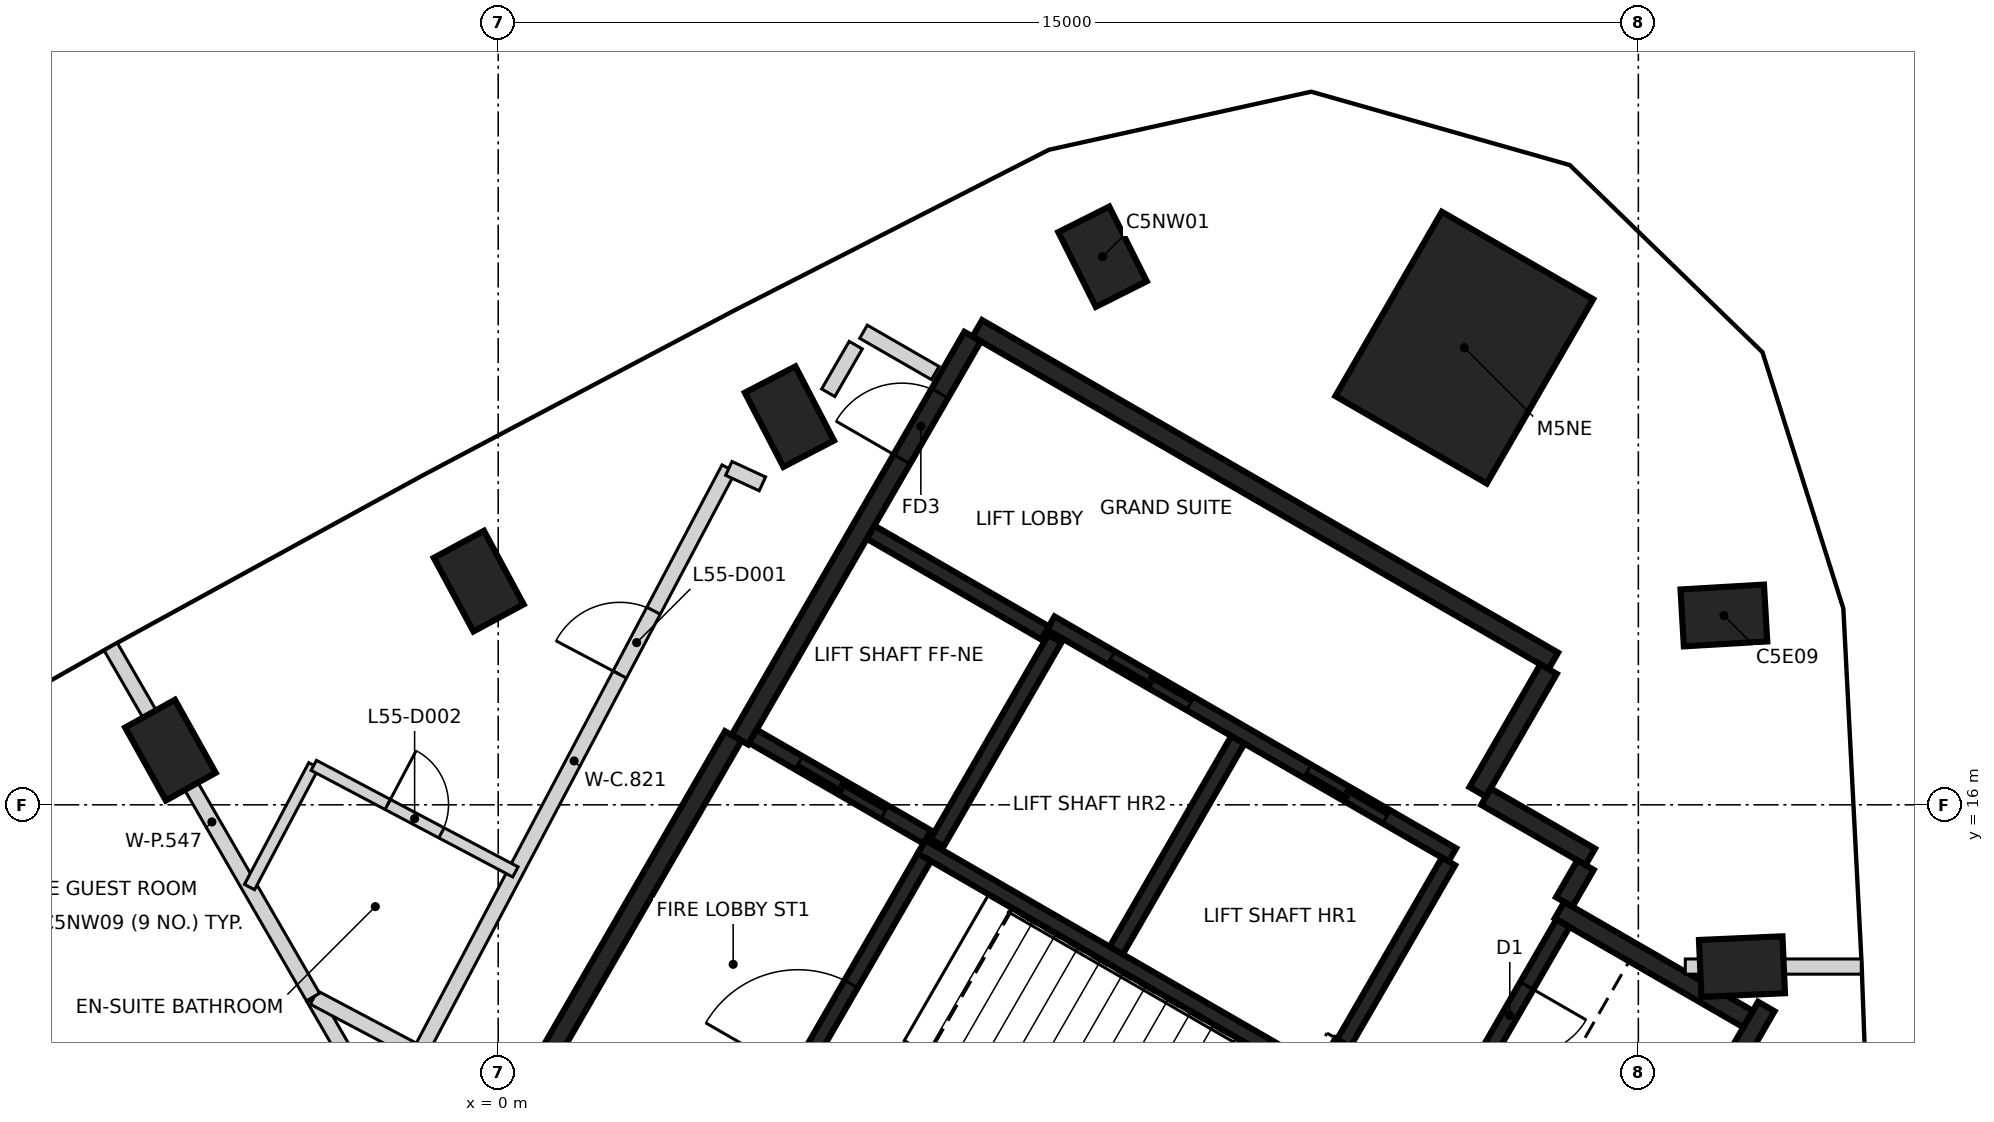
"""IFC4 building model, lengths in metres.
Left out: names, types, materials, properties, quantities, classifications, styles, units other than length and angle.
Written with IfcOpenShell. Run it as: python <this file> out.ifc"""

import sys

from ifc_helpers import new_model, si_unit, direction, frame, frame_2d, origin, origin_2d, place, context, subcontext, project, spatial, rectangle, extrude, element, fill, save


model = new_model("IFC4")
c1 = context("Model", 3, precision=1e-05, world=origin(), true_north=direction((0.0, 1.0)))
c2 = subcontext(c1, "Body", "Model", "MODEL_VIEW")
j1 = project(units=[si_unit("LENGTHUNIT", "METRE"), si_unit("PLANEANGLEUNIT", "RADIAN")], contexts=[c1])
p1 = place(None, origin())
s1 = spatial("IfcSite", under=j1, at=p1, CompositionType="ELEMENT")
p2 = place(p1, origin())
s2 = spatial("IfcBuilding", under=s1, at=p2, CompositionType="ELEMENT")
p3 = place(p2, frame((0.0, 0.0, 221.4)))
s3 = spatial("IfcBuildingStorey", under=s2, at=p3, CompositionType="ELEMENT", Elevation=221.4)
for number, where, z_axis, x_axis in (
    (1, (16.363, 13.872, -0.35), (0.0, 0.0, 1.0), (0.999, 0.044, 0.0)),
    (2, (16.125, 18.491, -0.35), (0.0, 0.0, 1.0), (0.998, 0.058, 0.0)),
    (3, (7.951, 23.211, -0.35), (0.0, 0.0, 1.0), (-0.449, 0.894, 0.0)),
    (4, (3.832, 21.107, -0.35), (0.0, 0.0, 1.0), (-0.461, 0.887, 0.0)),
    (5, (-0.256, 18.943, -0.35), (0.0, 0.0, 1.0), (-0.475, 0.88, 0.0)),
    (6, (-4.312, 16.719, -0.35), (0.0, 0.0, 1.0), (-0.487, 0.873, 0.0)),
):
    element("IfcColumn", number, at=place(p3, frame(where, z_axis=z_axis, x_axis=x_axis)), inside=s3, PredefinedType="COLUMN", context=c2, shape_type="SweptSolid", body=[
        extrude(rectangle(XDim=1.1, YDim=0.75, at=origin_2d()), origin(), (0.0, 0.0, 1.0), 3.6),
    ])
p4 = place(p3, frame((12.71, 22.015, -0.35), z_axis=(0.0, 0.0, 1.0), x_axis=(0.5, 0.866025403784, 0.0)))
e7 = element("IfcColumn", 7, at=p4, inside=s3, PredefinedType="COLUMN", context=c2, shape_type="SweptSolid", body=[
    extrude(rectangle(XDim=2.8, YDim=2.3, at=origin_2d()), origin(), (0.0, 0.0, 1.0), 3.6),
])
p5 = place(p3, frame((6.304, 22.269, 0.0), z_axis=(0.0, 0.0, 1.0), x_axis=(0.866022959057, -0.500004234368, 0.0)))
e8 = element("IfcWall", 8, at=p5, inside=s3, PredefinedType="SHEAR", context=c2, shape_type="SweptSolid", body=[
    extrude(rectangle(XDim=8.75, YDim=0.25, at=frame_2d((4.375, 0.0))), origin(), (0.0, 0.0, 1.0), 3.25),
])
p6 = place(p3, frame((3.179, 16.856, 0.0), z_axis=(0.0, 0.0, 1.0), x_axis=(0.500001955336, 0.866024274868, 0.0)))
e9 = element("IfcWall", 9, at=p6, inside=s3, PredefinedType="SHEAR", context=c2, shape_type="SweptSolid", body=[
    extrude(rectangle(XDim=6.125, YDim=0.25, at=frame_2d((3.062, 0.0))), origin(), (0.0, 0.0, 1.0), 3.25),
])
p7 = place(p6, frame((4.263, 0.0, 0.0)))
e10 = element("IfcOpeningElement", 10, at=p7, cuts=e9, PredefinedType="OPENING", context=c2, shape_type="SweptSolid", body=[
    extrude(rectangle(XDim=1.0, YDim=2.1, at=frame_2d((0.5, 1.05))), frame((0.0, 0.135, 0.0), z_axis=(0.0, -1.0, 0.0), x_axis=(1.0, 0.0, 0.0)), (0.0, 0.0, 1.0), 0.27),
])
p8 = place(p3, frame((0.48, 12.381, 0.0), z_axis=(0.0, 0.0, 1.0), x_axis=(0.49999885962, 0.866026062182, 0.0)))
e11 = element("IfcWall", 11, at=p8, inside=s3, PredefinedType="SHEAR", context=c2, shape_type="SweptSolid", body=[
    extrude(rectangle(XDim=5.225, YDim=0.25, at=frame_2d((2.612, 0.0))), origin(), (0.0, 0.0, 1.0), 3.25),
])
p9 = place(p3, frame((16.684, 13.347, 0.0), z_axis=(0.0, 0.0, 1.0), x_axis=(-0.499998874531, -0.866026053573, 0.0)))
e12 = element("IfcWall", 12, at=p9, inside=s3, PredefinedType="SHEAR", context=c2, shape_type="SweptSolid", body=[
    extrude(rectangle(XDim=3.313, YDim=0.25, at=frame_2d((1.656, 0.0))), origin(), (0.0, 0.0, 1.0), 3.25),
])
p10 = place(p3, frame((13.963, 14.614, 0.0), z_axis=(0.0, 0.0, 1.0), x_axis=(0.866042235819, -0.499970844928, 0.0)))
e13 = element("IfcWall", 13, at=p10, inside=s3, PredefinedType="SHEAR", context=c2, shape_type="SweptSolid", body=[
    extrude(rectangle(XDim=2.865, YDim=0.25, at=frame_2d((1.432, 0.0))), origin(), (0.0, 0.0, 1.0), 3.25),
])
p11 = place(p3, frame((13.819, 17.785, 0.0), z_axis=(0.0, 0.0, 1.0), x_axis=(-0.500039802285, -0.866002422705, 0.0)))
e14 = element("IfcWall", 14, at=p11, inside=s3, PredefinedType="SHEAR", context=c2, shape_type="SweptSolid", body=[
    extrude(rectangle(XDim=1.865, YDim=0.25, at=frame_2d((0.932, 0.0))), origin(), (0.0, 0.0, 1.0), 3.25),
])
p12 = place(p3, frame((12.433, 11.964, 0.0), z_axis=(0.0, 0.0, 1.0), x_axis=(-0.866038183914, 0.499977863513, 0.0)))
e15 = element("IfcWall", 15, at=p12, inside=s3, PredefinedType="SHEAR", context=c2, shape_type="SweptSolid", body=[
    extrude(rectangle(XDim=1.71, YDim=0.25, at=frame_2d((0.855, 0.0))), origin(), (0.0, 0.0, 1.0), 3.25),
])
p13 = place(p3, frame((12.995, 16.108, 0.0), z_axis=(0.0, 0.0, 1.0), x_axis=(0.866044474677, -0.49996696679, 0.0)))
e16 = element("IfcWall", 16, at=p13, inside=s3, PredefinedType="SHEAR", context=c2, shape_type="SweptSolid", body=[
    extrude(rectangle(XDim=1.584, YDim=0.25, at=frame_2d((0.792, 0.0))), origin(), (0.0, 0.0, 1.0), 3.25),
])
p14 = place(p3, frame((14.305, 15.207, 0.0), z_axis=(0.0, 0.0, 1.0), x_axis=(-0.499848422343, -0.866112899501, 0.0)))
e17 = element("IfcWall", 17, at=p14, inside=s3, PredefinedType="SHEAR", context=c2, shape_type="SweptSolid", body=[
    extrude(rectangle(XDim=0.559, YDim=0.25, at=frame_2d((0.28, 0.0))), origin(), (0.0, 0.0, 1.0), 3.25),
])
p15 = place(p3, frame((12.552, 15.342, 0.0), z_axis=(0.0, 0.0, 1.0), x_axis=(-0.866030299012, 0.499991521122, 0.0)))
e18 = element("IfcWall", 18, at=p15, inside=s3, PredefinedType="SHEAR", context=c2, shape_type="SweptSolid", body=[
    extrude(rectangle(XDim=6.1, YDim=0.2, at=frame_2d((3.05, 0.0))), origin(), (0.0, 0.0, 1.0), 3.25),
])
p16 = place(p15, frame((1.0, 0.0, 0.0)))
e19 = element("IfcOpeningElement", 19, at=p16, cuts=e18, PredefinedType="OPENING", context=c2, shape_type="SweptSolid", body=[
    extrude(rectangle(XDim=1.2, YDim=2.1, at=frame_2d((0.6, 1.05))), frame((0.0, 0.11, 0.0), z_axis=(0.0, -1.0, 0.0), x_axis=(1.0, 0.0, 0.0)), (0.0, 0.0, 1.0), 0.22),
])
p17 = place(p15, frame((3.982, 0.0, 0.0)))
e20 = element("IfcOpeningElement", 20, at=p17, cuts=e18, PredefinedType="OPENING", context=c2, shape_type="SweptSolid", body=[
    extrude(rectangle(XDim=1.2, YDim=2.1, at=frame_2d((0.6, 1.05))), frame((0.0, 0.11, 0.0), z_axis=(0.0, -1.0, 0.0), x_axis=(1.0, 0.0, 0.0)), (0.0, 0.0, 1.0), 0.22),
])
p18 = place(p3, frame((10.743, 12.46, 0.0), z_axis=(0.0, 0.0, 1.0), x_axis=(-0.866018848283, 0.500011354289, 0.0)))
e21 = element("IfcWall", 21, at=p18, inside=s3, PredefinedType="SHEAR", context=c2, shape_type="SweptSolid", body=[
    extrude(rectangle(XDim=5.974, YDim=0.2, at=frame_2d((2.987, 0.0))), origin(), (0.0, 0.0, 1.0), 3.25),
])
p19 = place(p3, frame((3.057, 10.895, 0.0), z_axis=(0.0, 0.0, 1.0), x_axis=(0.500027839223, 0.866009330205, 0.0)))
e22 = element("IfcWall", 22, at=p19, inside=s3, PredefinedType="SHEAR", context=c2, shape_type="SweptSolid", body=[
    extrude(rectangle(XDim=5.098, YDim=0.2, at=frame_2d((2.549, 0.0))), origin(), (0.0, 0.0, 1.0), 3.25),
])
p20 = place(p19, frame((1.774, 0.0, 0.0)))
e23 = element("IfcOpeningElement", 23, at=p20, cuts=e22, PredefinedType="OPENING", context=c2, shape_type="SweptSolid", body=[
    extrude(rectangle(XDim=1.4, YDim=2.1, at=frame_2d((0.7, 1.05))), frame((0.0, 0.11, 0.0), z_axis=(0.0, -1.0, 0.0), x_axis=(1.0, 0.0, 0.0)), (0.0, 0.0, 1.0), 0.22),
])
p21 = place(p3, frame((8.132, 14.084, 0.0), z_axis=(0.0, 0.0, 1.0), x_axis=(0.500030834389, 0.86600760081, 0.0)))
e24 = element("IfcWall", 24, at=p21, inside=s3, PredefinedType="SHEAR", context=c2, shape_type="SweptSolid", body=[
    extrude(rectangle(XDim=3.198, YDim=0.2, at=frame_2d((1.599, 0.0))), origin(), (0.0, 0.0, 1.0), 3.25),
])
p22 = place(p3, frame((14.008, 14.442, 0.0), z_axis=(0.0, 0.0, 1.0), x_axis=(-0.499986818241, -0.866033014143, 0.0)))
e25 = element("IfcWall", 25, at=p22, inside=s3, PredefinedType="SHEAR", context=c2, shape_type="SweptSolid", body=[
    extrude(rectangle(XDim=2.798, YDim=0.2, at=frame_2d((1.399, 0.0))), origin(), (0.0, 0.0, 1.0), 3.25),
])
p23 = place(p22, frame((0.949, 0.0, 0.0)))
e26 = element("IfcOpeningElement", 26, at=p23, cuts=e25, PredefinedType="OPENING", context=c2, shape_type="SweptSolid", body=[
    extrude(rectangle(XDim=0.9, YDim=2.1, at=frame_2d((0.45, 1.05))), frame((0.0, 0.11, 0.0), z_axis=(0.0, -1.0, 0.0), x_axis=(1.0, 0.0, 0.0)), (0.0, 0.0, 1.0), 0.22),
])
p24 = place(p3, frame((12.502, 15.255, 0.0), z_axis=(0.0, 0.0, 1.0), x_axis=(-0.499965018551, -0.866045599391, 0.0)))
e27 = element("IfcWall", 27, at=p24, inside=s3, PredefinedType="SHEAR", context=c2, shape_type="SweptSolid", body=[
    extrude(rectangle(XDim=2.759, YDim=0.2, at=frame_2d((1.379, 0.0))), origin(), (0.0, 0.0, 1.0), 3.25),
])
p25 = place(p3, frame((7.324, 18.187, 0.0), z_axis=(0.0, 0.0, 1.0), x_axis=(-0.499967891604, -0.866043940782, 0.0)))
e28 = element("IfcWall", 28, at=p25, inside=s3, PredefinedType="SHEAR", context=c2, shape_type="SweptSolid", body=[
    extrude(rectangle(XDim=3.1, YDim=0.2, at=frame_2d((1.55, 0.0))), origin(), (0.0, 0.0, 1.0), 3.25),
])
p26 = place(p3, frame((5.646, 15.576, 0.0), z_axis=(0.0, 0.0, 1.0), x_axis=(-0.866018407898, 0.500012117035, 0.0)))
e29 = element("IfcWall", 29, at=p26, inside=s3, PredefinedType="SHEAR", context=c2, shape_type="SweptSolid", body=[
    extrude(rectangle(XDim=2.651, YDim=0.2, at=frame_2d((1.325, 0.0))), origin(), (0.0, 0.0, 1.0), 3.25),
])
p27 = place(p26, frame((0.652, 0.0, 0.0)))
e30 = element("IfcOpeningElement", 30, at=p27, cuts=e29, PredefinedType="OPENING", context=c2, shape_type="SweptSolid", body=[
    extrude(rectangle(XDim=1.3, YDim=2.1, at=frame_2d((0.65, 1.05))), frame((0.0, 0.11, 0.0), z_axis=(0.0, -1.0, 0.0), x_axis=(1.0, 0.0, 0.0)), (0.0, 0.0, 1.0), 0.22),
])
p28 = place(p3, frame((7.196, 18.26, 0.0), z_axis=(0.0, 0.0, 1.0), x_axis=(-0.866018407898, 0.500012117035, 0.0)))
e31 = element("IfcWall", 31, at=p28, inside=s3, PredefinedType="SHEAR", context=c2, shape_type="SweptSolid", body=[
    extrude(rectangle(XDim=2.651, YDim=0.2, at=frame_2d((1.325, 0.0))), origin(), (0.0, 0.0, 1.0), 3.25),
])
p29 = place(p3, frame((-2.43, 13.459, 0.0), z_axis=(0.0, 0.0, 1.0), x_axis=(0.499957265187, -0.866050075334, 0.0)))
e32 = element("IfcWall", 32, at=p29, inside=s3, PredefinedType="PARTITIONING", context=c2, shape_type="SweptSolid", body=[
    extrude(rectangle(XDim=6.87, YDim=0.2, at=frame_2d((3.435, 0.0))), origin(), (0.0, 0.0, 1.0), 3.25),
])
p30 = place(p29, frame((3.275, 0.0, 0.0)))
e33 = element("IfcOpeningElement", 33, at=p30, cuts=e32, PredefinedType="OPENING", context=c2, shape_type="SweptSolid", body=[
    extrude(rectangle(XDim=1.0, YDim=2.1, at=frame_2d((0.5, 1.05))), frame((0.0, 0.11, 0.0), z_axis=(0.0, -1.0, 0.0), x_axis=(1.0, 0.0, 0.0)), (0.0, 0.0, 1.0), 0.22),
])
p31 = place(p3, frame((-2.425, 13.465, 0.0), z_axis=(0.0, 0.0, 1.0), x_axis=(0.883874806572, -0.467723557572, 0.0)))
e34 = element("IfcWall", 34, at=p31, inside=s3, PredefinedType="PARTITIONING", context=c2, shape_type="SweptSolid", body=[
    extrude(rectangle(XDim=1.572, YDim=0.2, at=frame_2d((0.786, 0.0))), origin(), (0.0, 0.0, 1.0), 3.25),
])
p32 = place(p3, frame((-1.035, 12.73, 0.0), z_axis=(0.0, 0.0, 1.0), x_axis=(0.46738248691, 0.884055208078, 0.0)))
e35 = element("IfcWall", 35, at=p32, inside=s3, PredefinedType="PARTITIONING", context=c2, shape_type="SweptSolid", body=[
    extrude(rectangle(XDim=8.705, YDim=0.2, at=frame_2d((4.352, 0.0))), origin(), (0.0, 0.0, 1.0), 3.25),
])
p33 = place(p32, frame((5.638, 0.0, 0.0)))
e36 = element("IfcOpeningElement", 36, at=p33, cuts=e35, PredefinedType="OPENING", context=c2, shape_type="SweptSolid", body=[
    extrude(rectangle(XDim=0.95, YDim=2.1, at=frame_2d((0.475, 1.05))), frame((0.0, 0.11, 0.0), z_axis=(0.0, -1.0, 0.0), x_axis=(1.0, 0.0, 0.0)), (0.0, 0.0, 1.0), 0.22),
])
p34 = place(p3, frame((3.034, 20.426, 0.0), z_axis=(0.0, 0.0, 1.0), x_axis=(0.907930035436, -0.41912176125, 0.0)))
e37 = element("IfcWall", 37, at=p34, inside=s3, PredefinedType="PARTITIONING", context=c2, shape_type="SweptSolid", body=[
    extrude(rectangle(XDim=0.487, YDim=0.2, at=frame_2d((0.244, 0.0))), origin(), (0.0, 0.0, 1.0), 3.25),
])
p35 = place(p3, frame((4.342, 21.421, 0.0), z_axis=(0.0, 0.0, 1.0), x_axis=(0.500238258503, 0.865887801468, 0.0)))
e38 = element("IfcWall", 38, at=p35, inside=s3, PredefinedType="PARTITIONING", context=c2, shape_type="SweptSolid", body=[
    extrude(rectangle(XDim=0.724, YDim=0.2, at=frame_2d((0.362, 0.0))), origin(), (0.0, 0.0, 1.0), 2.35),
])
p36 = place(p3, frame((4.806, 22.224, 0.0), z_axis=(0.0, 0.0, 1.0), x_axis=(0.866334698307, -0.499463903109, 0.0)))
e39 = element("IfcWall", 39, at=p36, inside=s3, PredefinedType="PARTITIONING", context=c2, shape_type="SweptSolid", body=[
    extrude(rectangle(XDim=1.09, YDim=0.2, at=frame_2d((0.545, 0.0))), origin(), (0.0, 0.0, 1.0), 2.35),
])
p37 = place(p3, frame((-9.119, 15.795, 0.0), z_axis=(0.0, 0.0, 1.0), x_axis=(0.50001601051, -0.866016159915, 0.0)))
e40 = element("IfcWall", 40, at=p37, inside=s3, PredefinedType="PARTITIONING", context=c2, shape_type="SweptSolid", body=[
    extrude(rectangle(XDim=12.238, YDim=0.2, at=frame_2d((6.119, 0.0))), origin(), (0.0, 0.0, 1.0), 3.25),
])
p38 = place(p3, frame((-5.097, 18.078, 0.0), z_axis=(0.0, 0.0, 1.0), x_axis=(0.50004820116, -0.865997573043, 0.0)))
e41 = element("IfcWall", 41, at=p38, inside=s3, PredefinedType="PARTITIONING", context=c2, shape_type="SweptSolid", body=[
    extrude(rectangle(XDim=5.32, YDim=0.2, at=frame_2d((2.66, 0.0))), origin(), (0.0, 0.0, 1.0), 3.25),
])
p39 = place(p3, frame((15.618, 13.872, 0.0), z_axis=(0.0, 0.0, 1.0), x_axis=(1.0, 0.0, 0.0)))
e42 = element("IfcWall", 42, at=p39, inside=s3, PredefinedType="PARTITIONING", context=c2, shape_type="SweptSolid", body=[
    extrude(rectangle(XDim=2.316, YDim=0.2, at=frame_2d((1.158, 0.0))), origin(), (0.0, 0.0, 1.0), 3.25),
])
p40 = place(p3, frame((-3.272, 14.918, 0.0), z_axis=(0.0, 0.0, 1.0), x_axis=(0.467162796658, 0.884171319043, 0.0)))
e43 = element("IfcWall", 43, at=p40, inside=s3, PredefinedType="PARTITIONING", context=c2, shape_type="SweptSolid", body=[
    extrude(rectangle(XDim=1.811, YDim=0.15, at=frame_2d((0.905, 0.0))), origin(), (0.0, 0.0, 1.0), 3.25),
])
p41 = place(p3, frame((-2.426, 16.519, 0.0), z_axis=(0.0, 0.0, 1.0), x_axis=(0.884056991815, -0.467379112952, 0.0)))
e44 = element("IfcWall", 44, at=p41, inside=s3, PredefinedType="PARTITIONING", context=c2, shape_type="SweptSolid", body=[
    extrude(rectangle(XDim=3.0, YDim=0.15, at=frame_2d((1.5, 0.0))), origin(), (0.0, 0.0, 1.0), 3.25),
])
p42 = place(p41, frame((1.1, 0.0, 0.0)))
e45 = element("IfcOpeningElement", 45, at=p42, cuts=e44, PredefinedType="OPENING", context=c2, shape_type="SweptSolid", body=[
    extrude(rectangle(XDim=0.8, YDim=2.1, at=frame_2d((0.4, 1.05))), frame((0.0, 0.085, 0.0), z_axis=(0.0, -1.0, 0.0), x_axis=(1.0, 0.0, 0.0)), (0.0, 0.0, 1.0), 0.17),
])
p43 = place(p27, origin())
e46 = element("IfcDoor", 46, at=p43, inside=s3, OperationType="SLIDING_TO_LEFT", PredefinedType="DOOR", context=c2, shape_type="SweptSolid", body=[
    extrude(rectangle(XDim=1.3, YDim=2.1, at=frame_2d((0.65, 1.05))), frame((0.0, 0.025, 0.0), z_axis=(0.0, -1.0, 0.0), x_axis=(1.0, 0.0, 0.0)), (0.0, 0.0, 1.0), 0.05),
])
fill(e30, e46)
p44 = place(p16, origin())
e47 = element("IfcDoor", 47, at=p44, inside=s3, OperationType="DOUBLE_DOOR_SLIDING", PredefinedType="DOOR", context=c2, shape_type="SweptSolid", body=[
    extrude(rectangle(XDim=1.2, YDim=2.1, at=frame_2d((0.6, 1.05))), frame((0.0, 0.025, 0.0), z_axis=(0.0, -1.0, 0.0), x_axis=(1.0, 0.0, 0.0)), (0.0, 0.0, 1.0), 0.05),
])
fill(e19, e47)
p45 = place(p17, origin())
e48 = element("IfcDoor", 48, at=p45, inside=s3, OperationType="DOUBLE_DOOR_SLIDING", PredefinedType="DOOR", context=c2, shape_type="SweptSolid", body=[
    extrude(rectangle(XDim=1.2, YDim=2.1, at=frame_2d((0.6, 1.05))), frame((0.0, 0.025, 0.0), z_axis=(0.0, -1.0, 0.0), x_axis=(1.0, 0.0, 0.0)), (0.0, 0.0, 1.0), 0.05),
])
fill(e20, e48)
p46 = place(p7, origin())
e49 = element("IfcDoor", 49, at=p46, inside=s3, OperationType="SINGLE_SWING_LEFT", PredefinedType="DOOR", context=c2, shape_type="SweptSolid", body=[
    extrude(rectangle(XDim=1.0, YDim=2.1, at=frame_2d((0.5, 1.05))), frame((0.0, 0.025, 0.0), z_axis=(0.0, -1.0, 0.0), x_axis=(1.0, 0.0, 0.0)), (0.0, 0.0, 1.0), 0.05),
])
fill(e10, e49)
p47 = place(p20, origin())
e50 = element("IfcDoor", 50, at=p47, inside=s3, OperationType="SINGLE_SWING_LEFT", PredefinedType="DOOR", context=c2, shape_type="SweptSolid", body=[
    extrude(rectangle(XDim=1.4, YDim=2.1, at=frame_2d((0.7, 1.05))), frame((0.0, 0.025, 0.0), z_axis=(0.0, -1.0, 0.0), x_axis=(1.0, 0.0, 0.0)), (0.0, 0.0, 1.0), 0.05),
])
fill(e23, e50)
p48 = place(p23, origin())
e51 = element("IfcDoor", 51, at=p48, inside=s3, OperationType="SINGLE_SWING_RIGHT", PredefinedType="DOOR", context=c2, shape_type="SweptSolid", body=[
    extrude(rectangle(XDim=0.9, YDim=2.1, at=frame_2d((0.45, 1.05))), frame((0.0, 0.025, 0.0), z_axis=(0.0, -1.0, 0.0), x_axis=(1.0, 0.0, 0.0)), (0.0, 0.0, 1.0), 0.05),
])
fill(e26, e51)
p49 = place(p33, frame((0.95, 0.0, 0.0), z_axis=(0.0, 0.0, 1.0), x_axis=(-1.0, 0.0, 0.0)))
e52 = element("IfcDoor", 52, at=p49, inside=s3, OperationType="SINGLE_SWING_LEFT", PredefinedType="DOOR", context=c2, shape_type="SweptSolid", body=[
    extrude(rectangle(XDim=0.95, YDim=2.1, at=frame_2d((0.475, 1.05))), frame((0.0, 0.025, 0.0), z_axis=(0.0, -1.0, 0.0), x_axis=(1.0, 0.0, 0.0)), (0.0, 0.0, 1.0), 0.05),
])
fill(e36, e52)
p50 = place(p42, origin())
e53 = element("IfcDoor", 53, at=p50, inside=s3, OperationType="SINGLE_SWING_LEFT", PredefinedType="DOOR", context=c2, shape_type="SweptSolid", body=[
    extrude(rectangle(XDim=0.8, YDim=2.1, at=frame_2d((0.4, 1.05))), frame((0.0, 0.025, 0.0), z_axis=(0.0, -1.0, 0.0), x_axis=(1.0, 0.0, 0.0)), (0.0, 0.0, 1.0), 0.05),
])
fill(e45, e53)
save(model, sys.argv[1])
